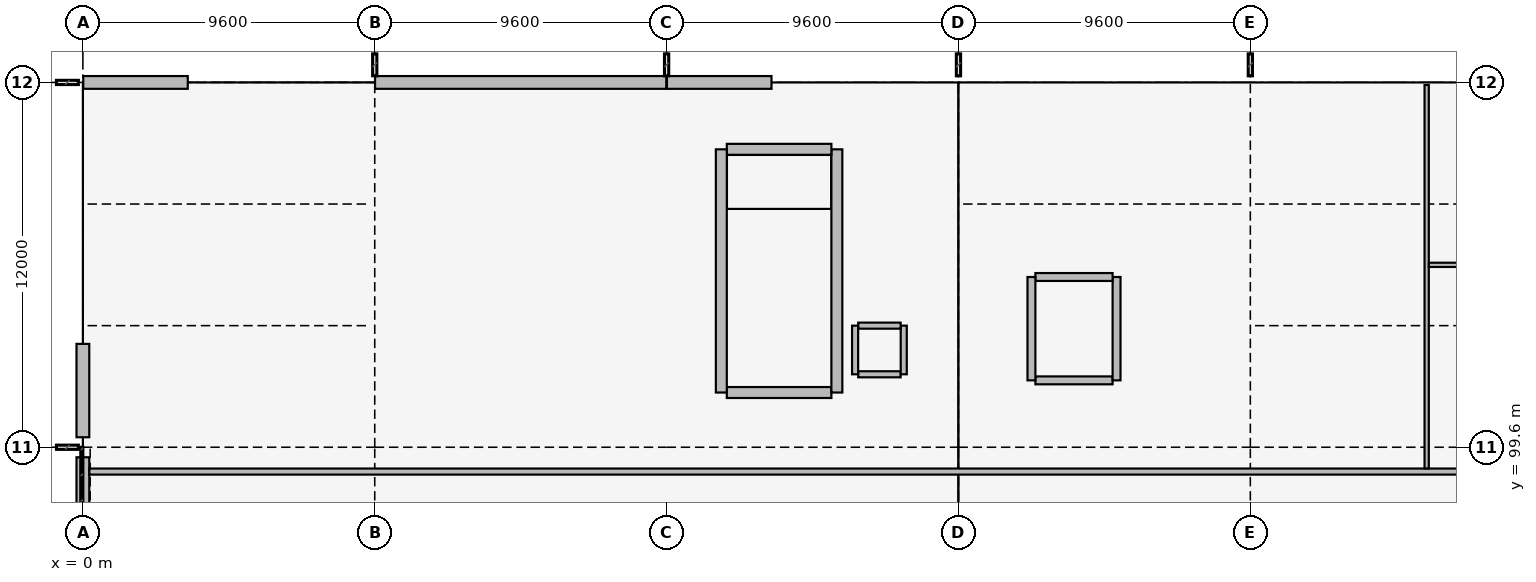
"""IFC4 building model, lengths in metres.
Left out: names, types, materials, properties, quantities, classifications, styles, units other than length and angle.
Written with IfcOpenShell. Run it as: python <this file> out.ifc"""

import sys

from ifc_helpers import new_model, si_unit, direction, frame, frame_2d, origin, origin_2d, place, context, subcontext, project, spatial, rectangle, i_section, extrude, element, fill, save


model = new_model("IFC4")
c1 = context("Model", 3, precision=1e-05, world=origin(), true_north=direction((0.0, 1.0)))
c2 = subcontext(c1, "Body", "Model", "MODEL_VIEW")
j1 = project(units=[si_unit("LENGTHUNIT", "METRE"), si_unit("PLANEANGLEUNIT", "RADIAN")], contexts=[c1])
p1 = place(None, origin())
s1 = spatial("IfcSite", under=j1, at=p1, CompositionType="ELEMENT")
p2 = place(p1, origin())
s2 = spatial("IfcBuilding", under=s1, at=p2, CompositionType="ELEMENT")
p3 = place(p2, origin())
s3 = spatial("IfcBuildingStorey", under=s2, at=p3, CompositionType="ELEMENT", Elevation=0.0)
for number, where, z_axis, x_axis in (
    (1, (0.0, 99.6, 0.0), (0.0, 0.0, 1.0), (1.0, 0.0, 0.0)),
    (2, (0.0, 111.6, 0.0), (0.0, 0.0, 1.0), (1.0, 0.0, 0.0)),
):
    element("IfcColumn", number, at=place(p3, frame(where, z_axis=z_axis, x_axis=x_axis)), inside=s3, PredefinedType="COLUMN", context=c2, shape_type="SweptSolid", body=[
        extrude(i_section(OverallWidth=0.3, OverallDepth=0.65, WebThickness=0.016, FlangeThickness=0.031, FilletRadius=0.027, at=origin_2d()), origin(), (0.0, 0.0, 1.0), 5.4),
    ])
for number, where, z_axis, x_axis in (
    (3, (9.6, 99.6, 0.0), (0.0, 0.0, 1.0), (1.0, 0.0, 0.0)),
    (4, (9.6, 111.6, 0.0), (0.0, 0.0, 1.0), (1.0, 0.0, 0.0)),
    (5, (19.2, 99.6, 0.0), (0.0, 0.0, 1.0), (1.0, 0.0, 0.0)),
    (6, (19.2, 111.6, 0.0), (0.0, 0.0, 1.0), (1.0, 0.0, 0.0)),
    (7, (28.8, 99.6, 0.0), (0.0, 0.0, 1.0), (1.0, 0.0, 0.0)),
    (8, (28.8, 111.6, 0.0), (0.0, 0.0, 1.0), (1.0, 0.0, 0.0)),
    (9, (38.4, 99.6, 0.0), (0.0, 0.0, 1.0), (1.0, 0.0, 0.0)),
    (10, (38.4, 111.6, 0.0), (0.0, 0.0, 1.0), (1.0, 0.0, 0.0)),
):
    element("IfcColumn", number, at=place(p3, frame(where, z_axis=z_axis, x_axis=x_axis)), inside=s3, PredefinedType="COLUMN", context=c2, shape_type="SweptSolid", body=[
        extrude(i_section(OverallWidth=0.3, OverallDepth=0.54, WebThickness=0.012, FlangeThickness=0.024, FilletRadius=0.027, at=origin_2d()), origin(), (0.0, 0.0, 1.0), 5.4),
    ])
p4 = place(p3, frame((24.62, 101.4, 0.0), z_axis=(0.0, 0.0, 1.0), x_axis=(-1.0, 0.0, 0.0)))
e11 = element("IfcWall", 11, at=p4, inside=s3, PredefinedType="SHEAR", context=c2, shape_type="SweptSolid", body=[
    extrude(rectangle(XDim=3.44, YDim=0.36, at=frame_2d((1.72, 0.0))), origin(), (0.0, 0.0, 1.0), 5.12),
])
p5 = place(p4, frame((0.95, 0.0, 0.0)))
e12 = element("IfcOpeningElement", 12, at=p5, cuts=e11, PredefinedType="OPENING", context=c2, shape_type="SweptSolid", body=[
    extrude(rectangle(XDim=1.0, YDim=2.15, at=frame_2d((0.5, 1.075))), frame((0.0, 0.19, 0.0), z_axis=(0.0, -1.0, 0.0), x_axis=(1.0, 0.0, 0.0)), (0.0, 0.0, 1.0), 0.38),
])
p6 = place(p3, frame((24.8, 101.4, 0.0), z_axis=(0.0, 0.0, 1.0), x_axis=(0.0, 1.0, 0.0)))
e13 = element("IfcWall", 13, at=p6, inside=s3, PredefinedType="SHEAR", context=c2, shape_type="SweptSolid", body=[
    extrude(rectangle(XDim=8.0, YDim=0.36, at=frame_2d((4.0, 0.0))), origin(), (0.0, 0.0, 1.0), 5.12),
])
p7 = place(p3, frame((24.62, 109.4, 0.0), z_axis=(0.0, 0.0, 1.0), x_axis=(-1.0, 0.0, 0.0)))
e14 = element("IfcWall", 14, at=p7, inside=s3, PredefinedType="SHEAR", context=c2, shape_type="SweptSolid", body=[
    extrude(rectangle(XDim=3.44, YDim=0.36, at=frame_2d((1.72, 0.0))), origin(), (0.0, 0.0, 1.0), 5.12),
])
p8 = place(p3, frame((21.0, 109.4, 0.0), z_axis=(0.0, 0.0, 1.0), x_axis=(0.0, -1.0, 0.0)))
e15 = element("IfcWall", 15, at=p8, inside=s3, PredefinedType="SHEAR", context=c2, shape_type="SweptSolid", body=[
    extrude(rectangle(XDim=8.0, YDim=0.36, at=frame_2d((4.0, 0.0))), origin(), (0.0, 0.0, 1.0), 5.12),
])
p9 = place(p3, frame((31.33, 101.8, 0.0), z_axis=(0.0, 0.0, 1.0), x_axis=(1.0, 0.0, 0.0)))
e16 = element("IfcWall", 16, at=p9, inside=s3, PredefinedType="SHEAR", context=c2, shape_type="SweptSolid", body=[
    extrude(rectangle(XDim=2.54, YDim=0.26, at=frame_2d((1.27, 0.0))), origin(), (0.0, 0.0, 1.0), 5.12),
])
p10 = place(p3, frame((34.0, 101.8, 0.0), z_axis=(0.0, 0.0, 1.0), x_axis=(0.0, 1.0, 0.0)))
e17 = element("IfcWall", 17, at=p10, inside=s3, PredefinedType="SHEAR", context=c2, shape_type="SweptSolid", body=[
    extrude(rectangle(XDim=3.4, YDim=0.26, at=frame_2d((1.7, 0.0))), origin(), (0.0, 0.0, 1.0), 5.12),
])
p11 = place(p3, frame((33.87, 105.2, 0.0), z_axis=(0.0, 0.0, 1.0), x_axis=(-1.0, 0.0, 0.0)))
e18 = element("IfcWall", 18, at=p11, inside=s3, PredefinedType="SHEAR", context=c2, shape_type="SweptSolid", body=[
    extrude(rectangle(XDim=2.54, YDim=0.26, at=frame_2d((1.27, 0.0))), origin(), (0.0, 0.0, 1.0), 5.12),
])
p12 = place(p11, frame((0.57, 0.0, 0.0)))
e19 = element("IfcOpeningElement", 19, at=p12, cuts=e18, PredefinedType="OPENING", context=c2, shape_type="SweptSolid", body=[
    extrude(rectangle(XDim=1.4, YDim=2.25, at=frame_2d((0.7, 1.125))), frame((0.0, 0.14, 0.0), z_axis=(0.0, -1.0, 0.0), x_axis=(1.0, 0.0, 0.0)), (0.0, 0.0, 1.0), 0.28),
])
p13 = place(p3, frame((31.2, 105.2, 0.0), z_axis=(0.0, 0.0, 1.0), x_axis=(0.0, -1.0, 0.0)))
e20 = element("IfcWall", 20, at=p13, inside=s3, PredefinedType="SHEAR", context=c2, shape_type="SweptSolid", body=[
    extrude(rectangle(XDim=3.4, YDim=0.26, at=frame_2d((1.7, 0.0))), origin(), (0.0, 0.0, 1.0), 5.12),
])
p14 = place(p3, frame((0.0, 87.929, 0.0), z_axis=(0.0, 0.0, 1.0), x_axis=(0.0, 1.0, 0.0)))
e21 = element("IfcWall", 21, at=p14, inside=s3, PredefinedType="STANDARD", context=c2, shape_type="SweptSolid", body=[
    extrude(rectangle(XDim=11.342, YDim=0.42, at=frame_2d((5.671, 0.0))), origin(), (0.0, 0.0, 1.0), 4.7),
])
p15 = place(p3, frame((0.0, 99.929, 0.0), z_axis=(0.0, 0.0, 1.0), x_axis=(0.0, 1.0, 0.0)))
e22 = element("IfcWall", 22, at=p15, inside=s3, PredefinedType="STANDARD", context=c2, shape_type="SweptSolid", body=[
    extrude(rectangle(XDim=3.071, YDim=0.42, at=frame_2d((1.536, 0.0))), origin(), (0.0, 0.0, 1.0), 4.7),
])
p16 = place(p15, frame((0.55, 0.0, 0.0)))
e23 = element("IfcOpeningElement", 23, at=p16, cuts=e22, PredefinedType="OPENING", context=c2, shape_type="SweptSolid", body=[
    extrude(rectangle(XDim=2.0, YDim=2.3, at=frame_2d((1.0, 1.15))), frame((0.0, 0.22, 0.0), z_axis=(0.0, -1.0, 0.0), x_axis=(1.0, 0.0, 0.0)), (0.0, 0.0, 1.0), 0.44),
])
p17 = place(p3, frame((0.012, 111.6, 0.0), z_axis=(0.0, 0.0, 1.0), x_axis=(1.0, 0.0, 0.0)))
e24 = element("IfcWall", 24, at=p17, inside=s3, PredefinedType="STANDARD", context=c2, shape_type="SweptSolid", body=[
    extrude(rectangle(XDim=3.438, YDim=0.42, at=frame_2d((1.719, 0.0))), origin(), (0.0, 0.0, 1.0), 4.7),
])
p18 = place(p17, frame((0.45, 0.0, 0.0)))
e25 = element("IfcOpeningElement", 25, at=p18, cuts=e24, PredefinedType="OPENING", context=c2, shape_type="SweptSolid", body=[
    extrude(rectangle(XDim=2.2, YDim=2.4, at=frame_2d((1.1, 1.2))), frame((0.0, 0.22, 0.0), z_axis=(0.0, -1.0, 0.0), x_axis=(1.0, 0.0, 0.0)), (0.0, 0.0, 1.0), 0.44),
])
p19 = place(p3, frame((9.61, 111.6, 0.0), z_axis=(0.0, 0.0, 1.0), x_axis=(1.0, 0.0, 0.0)))
e26 = element("IfcWall", 26, at=p19, inside=s3, PredefinedType="STANDARD", context=c2, shape_type="SweptSolid", body=[
    extrude(rectangle(XDim=9.58, YDim=0.42, at=frame_2d((4.79, 0.0))), origin(), (0.0, 0.0, 1.0), 4.665),
])
p20 = place(p19, frame((0.9, 0.0, 1.4)))
e27 = element("IfcOpeningElement", 27, at=p20, cuts=e26, PredefinedType="OPENING", context=c2, shape_type="SweptSolid", body=[
    extrude(rectangle(XDim=3.6, YDim=1.2, at=frame_2d((1.8, 0.6))), frame((0.0, 0.22, 0.0), z_axis=(0.0, -1.0, 0.0), x_axis=(1.0, 0.0, 0.0)), (0.0, 0.0, 1.0), 0.44),
])
p21 = place(p19, frame((5.2, 0.0, 1.4)))
e28 = element("IfcOpeningElement", 28, at=p21, cuts=e26, PredefinedType="OPENING", context=c2, shape_type="SweptSolid", body=[
    extrude(rectangle(XDim=3.0, YDim=1.8, at=frame_2d((1.5, 0.9))), frame((0.0, 0.22, 0.0), z_axis=(0.0, -1.0, 0.0), x_axis=(1.0, 0.0, 0.0)), (0.0, 0.0, 1.0), 0.44),
])
p22 = place(p3, frame((19.21, 111.6, 0.0), z_axis=(0.0, 0.0, 1.0), x_axis=(1.0, 0.0, 0.0)))
e29 = element("IfcWall", 29, at=p22, inside=s3, PredefinedType="STANDARD", context=c2, shape_type="SweptSolid", body=[
    extrude(rectangle(XDim=3.44, YDim=0.42, at=frame_2d((1.72, 0.0))), origin(), (0.0, 0.0, 1.0), 4.665),
])
p23 = place(p22, frame((0.45, 0.0, 0.0)))
e30 = element("IfcOpeningElement", 30, at=p23, cuts=e29, PredefinedType="OPENING", context=c2, shape_type="SweptSolid", body=[
    extrude(rectangle(XDim=2.2, YDim=2.4, at=frame_2d((1.1, 1.2))), frame((0.0, 0.22, 0.0), z_axis=(0.0, -1.0, 0.0), x_axis=(1.0, 0.0, 0.0)), (0.0, 0.0, 1.0), 0.44),
])
p24 = place(p3, frame((0.212, 98.8, 0.0), z_axis=(0.0, 0.0, 1.0), x_axis=(1.0, 0.0, 0.0)))
e31 = element("IfcWall", 31, at=p24, inside=s3, PredefinedType="PARTITIONING", context=c2, shape_type="SweptSolid", body=[
    extrude(rectangle(XDim=57.306, YDim=0.2, at=frame_2d((28.653, 0.0))), origin(), (0.0, 0.0, 1.0), 5.04),
])
p25 = place(p24, frame((13.5, 0.0, 0.0)))
e32 = element("IfcOpeningElement", 32, at=p25, cuts=e31, PredefinedType="OPENING", context=c2, shape_type="SweptSolid", body=[
    extrude(rectangle(XDim=1.6, YDim=2.2, at=frame_2d((0.8, 1.1))), frame((0.0, 0.11, 0.0), z_axis=(0.0, -1.0, 0.0), x_axis=(1.0, 0.0, 0.0)), (0.0, 0.0, 1.0), 0.22),
])
p26 = place(p24, frame((33.333, 0.0, 0.0)))
e33 = element("IfcOpeningElement", 33, at=p26, cuts=e31, PredefinedType="OPENING", context=c2, shape_type="SweptSolid", body=[
    extrude(rectangle(XDim=1.6, YDim=2.2, at=frame_2d((0.8, 1.1))), frame((0.0, 0.11, 0.0), z_axis=(0.0, -1.0, 0.0), x_axis=(1.0, 0.0, 0.0)), (0.0, 0.0, 1.0), 0.22),
])
p27 = place(p24, frame((44.267, 0.0, 0.0)))
e34 = element("IfcOpeningElement", 34, at=p27, cuts=e31, PredefinedType="OPENING", context=c2, shape_type="SweptSolid", body=[
    extrude(rectangle(XDim=1.02, YDim=2.12, at=frame_2d((0.51, 1.06))), frame((0.0, 0.11, 0.0), z_axis=(0.0, -1.0, 0.0), x_axis=(1.0, 0.0, 0.0)), (0.0, 0.0, 1.0), 0.22),
])
p28 = place(p24, frame((51.067, 0.0, 0.0)))
e35 = element("IfcOpeningElement", 35, at=p28, cuts=e31, PredefinedType="OPENING", context=c2, shape_type="SweptSolid", body=[
    extrude(rectangle(XDim=0.95, YDim=2.1, at=frame_2d((0.475, 1.05))), frame((0.0, 0.11, 0.0), z_axis=(0.0, -1.0, 0.0), x_axis=(1.0, 0.0, 0.0)), (0.0, 0.0, 1.0), 0.22),
])
p29 = place(p24, frame((54.0, 0.0, 0.0)))
e36 = element("IfcOpeningElement", 36, at=p29, cuts=e31, PredefinedType="OPENING", context=c2, shape_type="SweptSolid", body=[
    extrude(rectangle(XDim=1.0, YDim=2.1, at=frame_2d((0.5, 1.05))), frame((0.0, 0.11, 0.0), z_axis=(0.0, -1.0, 0.0), x_axis=(1.0, 0.0, 0.0)), (0.0, 0.0, 1.0), 0.22),
])
p30 = place(p3, frame((44.2, 98.902, 0.0), z_axis=(0.0, 0.0, 1.0), x_axis=(0.0, 1.0, 0.0)))
e37 = element("IfcWall", 37, at=p30, inside=s3, PredefinedType="PARTITIONING", context=c2, shape_type="SweptSolid", body=[
    extrude(rectangle(XDim=12.616, YDim=0.14, at=frame_2d((6.308, 0.0))), origin(), (0.0, 0.0, 1.0), 5.04),
])
p31 = place(p30, frame((8.0, 0.0, 0.0)))
e38 = element("IfcOpeningElement", 38, at=p31, cuts=e37, PredefinedType="OPENING", context=c2, shape_type="SweptSolid", body=[
    extrude(rectangle(XDim=1.05, YDim=2.15, at=frame_2d((0.525, 1.075))), frame((0.0, 0.08, 0.0), z_axis=(0.0, -1.0, 0.0), x_axis=(1.0, 0.0, 0.0)), (0.0, 0.0, 1.0), 0.16),
])
p32 = place(p3, frame((44.272, 105.6, 0.0), z_axis=(0.0, 0.0, 1.0), x_axis=(1.0, 0.0, 0.0)))
e39 = element("IfcWall", 39, at=p32, inside=s3, PredefinedType="PARTITIONING", context=c2, shape_type="SweptSolid", body=[
    extrude(rectangle(XDim=13.136, YDim=0.14, at=frame_2d((6.568, 0.0))), origin(), (0.0, 0.0, 1.0), 5.04),
])
p33 = place(p3, frame((25.502, 102.0, 0.0), z_axis=(0.0, 0.0, 1.0), x_axis=(1.0, 0.0, 0.0)))
e40 = element("IfcWall", 40, at=p33, inside=s3, PredefinedType="PARTITIONING", context=c2, shape_type="SweptSolid", body=[
    extrude(rectangle(XDim=1.396, YDim=0.2, at=frame_2d((0.698, 0.0))), origin(), (0.0, 0.0, 1.0), 5.04),
])
p34 = place(p3, frame((27.0, 102.0, 0.0), z_axis=(0.0, 0.0, 1.0), x_axis=(0.0, 1.0, 0.0)))
e41 = element("IfcWall", 41, at=p34, inside=s3, PredefinedType="PARTITIONING", context=c2, shape_type="SweptSolid", body=[
    extrude(rectangle(XDim=1.6, YDim=0.2, at=frame_2d((0.8, 0.0))), origin(), (0.0, 0.0, 1.0), 5.04),
])
p35 = place(p3, frame((26.898, 103.6, 0.0), z_axis=(0.0, 0.0, 1.0), x_axis=(-1.0, 0.0, 0.0)))
e42 = element("IfcWall", 42, at=p35, inside=s3, PredefinedType="PARTITIONING", context=c2, shape_type="SweptSolid", body=[
    extrude(rectangle(XDim=1.396, YDim=0.2, at=frame_2d((0.698, 0.0))), origin(), (0.0, 0.0, 1.0), 5.04),
])
p36 = place(p3, frame((25.4, 103.6, 0.0), z_axis=(0.0, 0.0, 1.0), x_axis=(0.0, -1.0, 0.0)))
e43 = element("IfcWall", 43, at=p36, inside=s3, PredefinedType="PARTITIONING", context=c2, shape_type="SweptSolid", body=[
    extrude(rectangle(XDim=1.6, YDim=0.2, at=frame_2d((0.8, 0.0))), origin(), (0.0, 0.0, 1.0), 5.04),
])
p37 = place(p16, origin())
e44 = element("IfcDoor", 44, at=p37, inside=s3, OperationType="DOUBLE_DOOR_SINGLE_SWING", PredefinedType="DOOR", context=c2, shape_type="SweptSolid", body=[
    extrude(rectangle(XDim=2.0, YDim=2.3, at=frame_2d((1.0, 1.15))), frame((0.0, 0.025, 0.0), z_axis=(0.0, -1.0, 0.0), x_axis=(1.0, 0.0, 0.0)), (0.0, 0.0, 1.0), 0.05),
])
fill(e23, e44)
p38 = place(p18, origin())
e45 = element("IfcDoor", 45, at=p38, inside=s3, OperationType="DOUBLE_DOOR_SINGLE_SWING", PredefinedType="DOOR", context=c2, shape_type="SweptSolid", body=[
    extrude(rectangle(XDim=2.2, YDim=2.4, at=frame_2d((1.1, 1.2))), frame((0.0, 0.025, 0.0), z_axis=(0.0, -1.0, 0.0), x_axis=(1.0, 0.0, 0.0)), (0.0, 0.0, 1.0), 0.05),
])
fill(e25, e45)
p39 = place(p20, origin())
e46 = element("IfcWindow", 46, at=p39, inside=s3, PartitioningType="SINGLE_PANEL", PredefinedType="WINDOW", context=c2, shape_type="SweptSolid", body=[
    extrude(rectangle(XDim=3.6, YDim=1.2, at=frame_2d((1.8, 0.6))), frame((0.0, 0.03, 0.0), z_axis=(0.0, -1.0, 0.0), x_axis=(1.0, 0.0, 0.0)), (0.0, 0.0, 1.0), 0.06),
])
fill(e27, e46)
p40 = place(p21, origin())
e47 = element("IfcWindow", 47, at=p40, inside=s3, PartitioningType="SINGLE_PANEL", PredefinedType="WINDOW", context=c2, shape_type="SweptSolid", body=[
    extrude(rectangle(XDim=3.0, YDim=1.8, at=frame_2d((1.5, 0.9))), frame((0.0, 0.03, 0.0), z_axis=(0.0, -1.0, 0.0), x_axis=(1.0, 0.0, 0.0)), (0.0, 0.0, 1.0), 0.06),
])
fill(e28, e47)
p41 = place(p23, origin())
e48 = element("IfcDoor", 48, at=p41, inside=s3, OperationType="DOUBLE_DOOR_SINGLE_SWING", PredefinedType="DOOR", context=c2, shape_type="SweptSolid", body=[
    extrude(rectangle(XDim=2.2, YDim=2.4, at=frame_2d((1.1, 1.2))), frame((0.0, 0.025, 0.0), z_axis=(0.0, -1.0, 0.0), x_axis=(1.0, 0.0, 0.0)), (0.0, 0.0, 1.0), 0.05),
])
fill(e30, e48)
p42 = place(p25, origin())
e49 = element("IfcDoor", 49, at=p42, inside=s3, OperationType="SINGLE_SWING_RIGHT", PredefinedType="DOOR", context=c2, shape_type="SweptSolid", body=[
    extrude(rectangle(XDim=1.6, YDim=2.2, at=frame_2d((0.8, 1.1))), frame((0.0, 0.025, 0.0), z_axis=(0.0, -1.0, 0.0), x_axis=(1.0, 0.0, 0.0)), (0.0, 0.0, 1.0), 0.05),
])
fill(e32, e49)
p43 = place(p26, origin())
e50 = element("IfcDoor", 50, at=p43, inside=s3, OperationType="SINGLE_SWING_LEFT", PredefinedType="DOOR", context=c2, shape_type="SweptSolid", body=[
    extrude(rectangle(XDim=1.6, YDim=2.2, at=frame_2d((0.8, 1.1))), frame((0.0, 0.025, 0.0), z_axis=(0.0, -1.0, 0.0), x_axis=(1.0, 0.0, 0.0)), (0.0, 0.0, 1.0), 0.05),
])
fill(e33, e50)
p44 = place(p27, origin())
e51 = element("IfcDoor", 51, at=p44, inside=s3, OperationType="SINGLE_SWING_RIGHT", PredefinedType="DOOR", context=c2, shape_type="SweptSolid", body=[
    extrude(rectangle(XDim=1.02, YDim=2.12, at=frame_2d((0.51, 1.06))), frame((0.0, 0.025, 0.0), z_axis=(0.0, -1.0, 0.0), x_axis=(1.0, 0.0, 0.0)), (0.0, 0.0, 1.0), 0.05),
])
fill(e34, e51)
p45 = place(p31, origin())
e52 = element("IfcDoor", 52, at=p45, inside=s3, OperationType="SINGLE_SWING_LEFT", PredefinedType="DOOR", context=c2, shape_type="SweptSolid", body=[
    extrude(rectangle(XDim=1.05, YDim=2.15, at=frame_2d((0.525, 1.075))), frame((0.0, 0.025, 0.0), z_axis=(0.0, -1.0, 0.0), x_axis=(1.0, 0.0, 0.0)), (0.0, 0.0, 1.0), 0.05),
])
fill(e38, e52)
p46 = place(p5, origin())
e53 = element("IfcDoor", 53, at=p46, inside=s3, OperationType="SINGLE_SWING_RIGHT", PredefinedType="DOOR", context=c2, shape_type="SweptSolid", body=[
    extrude(rectangle(XDim=1.0, YDim=2.15, at=frame_2d((0.5, 1.075))), frame((0.0, 0.025, 0.0), z_axis=(0.0, -1.0, 0.0), x_axis=(1.0, 0.0, 0.0)), (0.0, 0.0, 1.0), 0.05),
])
fill(e12, e53)
p47 = place(p12, origin())
e54 = element("IfcDoor", 54, at=p47, inside=s3, OperationType="DOUBLE_DOOR_SLIDING", PredefinedType="DOOR", context=c2, shape_type="SweptSolid", body=[
    extrude(rectangle(XDim=1.4, YDim=2.25, at=frame_2d((0.7, 1.125))), frame((0.0, 0.025, 0.0), z_axis=(0.0, -1.0, 0.0), x_axis=(1.0, 0.0, 0.0)), (0.0, 0.0, 1.0), 0.05),
])
fill(e19, e54)
save(model, sys.argv[1])
